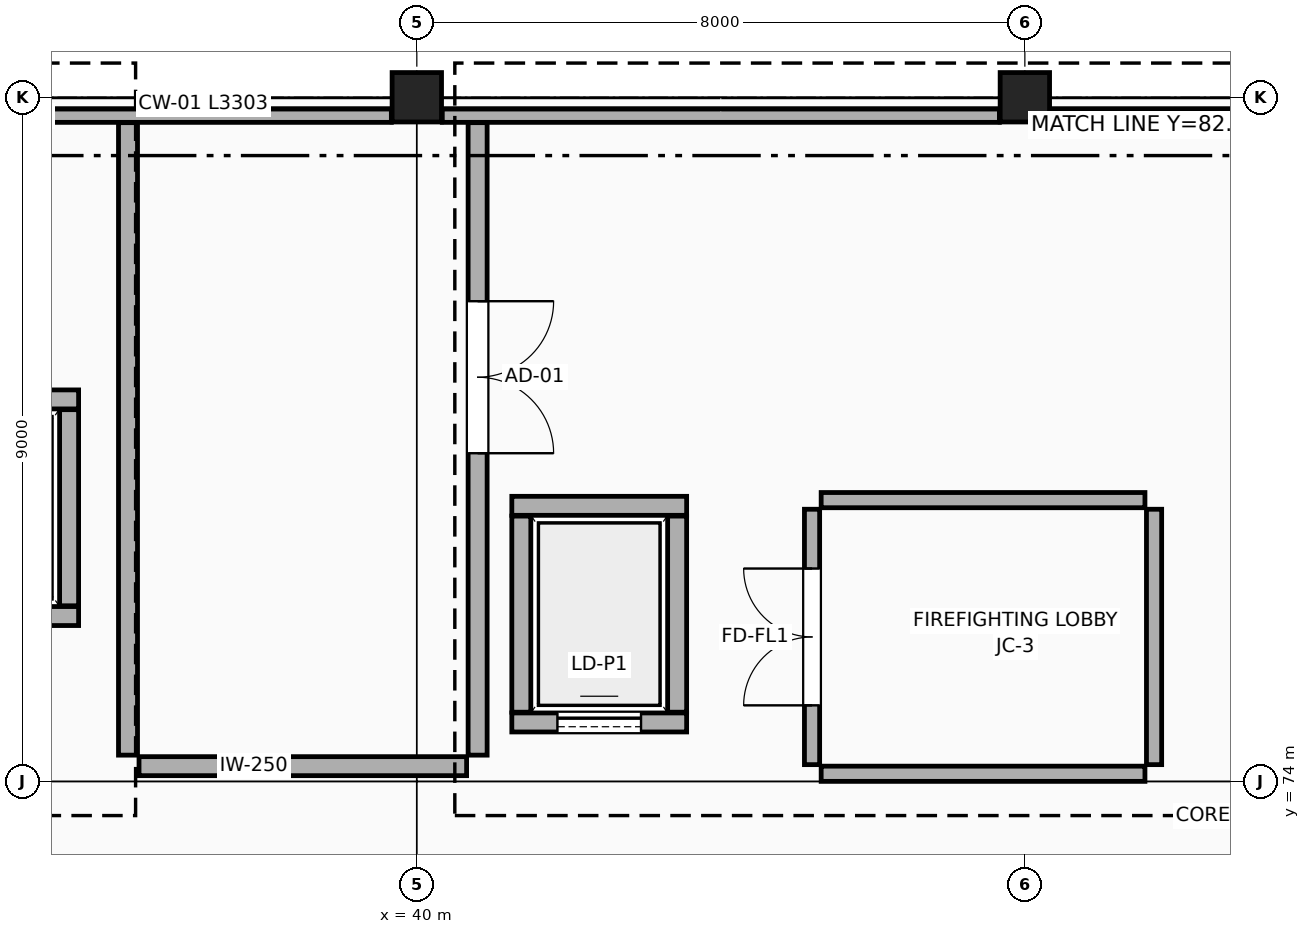
"""IFC4 building model, lengths in metres.
Left out: names, types, materials, properties, quantities, classifications, styles, units other than length and angle.
Written with IfcOpenShell. Run it as: python <this file> out.ifc"""

import sys

from ifc_helpers import new_model, si_unit, direction, frame, frame_2d, origin, origin_2d, place, context, subcontext, project, spatial, rectangle, extrude, element, fill, save


model = new_model("IFC4")
c1 = context("Model", 3, precision=1e-05, world=origin(), true_north=direction((0.0, 1.0)))
c2 = subcontext(c1, "Body", "Model", "MODEL_VIEW")
j1 = project(units=[si_unit("LENGTHUNIT", "METRE"), si_unit("PLANEANGLEUNIT", "RADIAN")], contexts=[c1])
p1 = place(None, origin())
s1 = spatial("IfcSite", under=j1, at=p1, CompositionType="ELEMENT")
p2 = place(p1, origin())
s2 = spatial("IfcBuilding", under=s1, at=p2, CompositionType="ELEMENT")
p3 = place(p2, frame((0.0, 0.0, 24.3)))
s3 = spatial("IfcBuildingStorey", under=s2, at=p3, CompositionType="ELEMENT", Elevation=24.3)
for number, where, z_axis, x_axis in (
    (1, (40.0, 83.0, 0.0), (0.0, 0.0, 1.0), (1.0, 0.0, 0.0)),
    (2, (48.0, 83.0, 0.0), (0.0, 0.0, 1.0), (1.0, 0.0, 0.0)),
):
    element("IfcColumn", number, at=place(p3, frame(where, z_axis=z_axis, x_axis=x_axis)), inside=s3, PredefinedType="COLUMN", context=c2, shape_type="SweptSolid", body=[
        extrude(rectangle(XDim=0.65, YDim=0.65, at=origin_2d()), origin(), (0.0, 0.0, 1.0), 4.46),
    ])
p4 = place(p3, frame((33.17, 82.76, 0.0), z_axis=(0.0, 0.0, 1.0), x_axis=(1.0, 0.0, 0.0)))
e3 = element("IfcWall", 3, at=p4, inside=s3, PredefinedType="PARAPET", context=c2, shape_type="SweptSolid", body=[
    extrude(rectangle(XDim=6.495, YDim=0.18, at=frame_2d((3.248, 0.0))), origin(), (0.0, 0.0, 1.0), 0.88),
])
p5 = place(p3, frame((40.335, 82.76, 0.0), z_axis=(0.0, 0.0, 1.0), x_axis=(1.0, 0.0, 0.0)))
e4 = element("IfcWall", 4, at=p5, inside=s3, PredefinedType="PARAPET", context=c2, shape_type="SweptSolid", body=[
    extrude(rectangle(XDim=7.33, YDim=0.18, at=frame_2d((3.665, 0.0))), origin(), (0.0, 0.0, 1.0), 0.88),
])
p6 = place(p3, frame((48.335, 82.76, 0.0), z_axis=(0.0, 0.0, 1.0), x_axis=(1.0, 0.0, 0.0)))
e5 = element("IfcWall", 5, at=p6, inside=s3, PredefinedType="PARAPET", context=c2, shape_type="SweptSolid", body=[
    extrude(rectangle(XDim=5.895, YDim=0.18, at=frame_2d((2.948, 0.0))), origin(), (0.0, 0.0, 1.0), 0.88),
])
p7 = place(p3, frame((41.25, 74.775, 0.0), z_axis=(0.0, 0.0, 1.0), x_axis=(1.0, 0.0, 0.0)))
e6 = element("IfcWall", 6, at=p7, inside=s3, PredefinedType="STANDARD", context=c2, shape_type="SweptSolid", body=[
    extrude(rectangle(XDim=2.3, YDim=0.25, at=frame_2d((1.15, 0.0))), origin(), (0.0, 0.0, 1.0), 4.27),
])
p8 = place(p7, frame((0.6, 0.0, 0.0)))
e7 = element("IfcOpeningElement", 7, at=p8, cuts=e6, PredefinedType="OPENING", context=c2, shape_type="SweptSolid", body=[
    extrude(rectangle(XDim=1.1, YDim=2.15, at=frame_2d((0.55, 1.075))), frame((0.0, 0.135, 0.0), z_axis=(0.0, -1.0, 0.0), x_axis=(1.0, 0.0, 0.0)), (0.0, 0.0, 1.0), 0.27),
])
p9 = place(p3, frame((43.55, 77.625, 0.0), z_axis=(0.0, 0.0, 1.0), x_axis=(-1.0, 0.0, 0.0)))
e8 = element("IfcWall", 8, at=p9, inside=s3, PredefinedType="STANDARD", context=c2, shape_type="SweptSolid", body=[
    extrude(rectangle(XDim=2.3, YDim=0.25, at=frame_2d((1.15, 0.0))), origin(), (0.0, 0.0, 1.0), 4.27),
])
for number, where, z_axis, x_axis in (
    (9, (43.425, 74.91, 0.0), (0.0, 0.0, 1.0), (0.0, 1.0, 0.0)),
    (10, (41.375, 77.49, 0.0), (0.0, 0.0, 1.0), (0.0, -1.0, 0.0)),
):
    element("IfcWall", number, at=place(p3, frame(where, z_axis=z_axis, x_axis=x_axis)), inside=s3, PredefinedType="STANDARD", context=c2, shape_type="SweptSolid", body=[
        extrude(rectangle(XDim=2.58, YDim=0.25, at=frame_2d((1.29, 0.0))), origin(), (0.0, 0.0, 1.0), 4.27),
    ])
p10 = place(p3, frame((33.25, 76.175, 0.0), z_axis=(0.0, 0.0, 1.0), x_axis=(1.0, 0.0, 0.0)))
e11 = element("IfcWall", 11, at=p10, inside=s3, PredefinedType="STANDARD", context=c2, shape_type="SweptSolid", body=[
    extrude(rectangle(XDim=2.3, YDim=0.25, at=frame_2d((1.15, 0.0))), origin(), (0.0, 0.0, 1.0), 4.27),
])
p11 = place(p10, frame((0.6, 0.0, 0.0)))
e12 = element("IfcOpeningElement", 12, at=p11, cuts=e11, PredefinedType="OPENING", context=c2, shape_type="SweptSolid", body=[
    extrude(rectangle(XDim=1.1, YDim=2.15, at=frame_2d((0.55, 1.075))), frame((0.0, 0.135, 0.0), z_axis=(0.0, -1.0, 0.0), x_axis=(1.0, 0.0, 0.0)), (0.0, 0.0, 1.0), 0.27),
])
p12 = place(p3, frame((35.55, 79.025, 0.0), z_axis=(0.0, 0.0, 1.0), x_axis=(-1.0, 0.0, 0.0)))
e13 = element("IfcWall", 13, at=p12, inside=s3, PredefinedType="STANDARD", context=c2, shape_type="SweptSolid", body=[
    extrude(rectangle(XDim=2.3, YDim=0.25, at=frame_2d((1.15, 0.0))), origin(), (0.0, 0.0, 1.0), 4.27),
])
p13 = place(p3, frame((35.425, 76.31, 0.0), z_axis=(0.0, 0.0, 1.0), x_axis=(0.0, 1.0, 0.0)))
e14 = element("IfcWall", 14, at=p13, inside=s3, PredefinedType="STANDARD", context=c2, shape_type="SweptSolid", body=[
    extrude(rectangle(XDim=2.58, YDim=0.25, at=frame_2d((1.29, 0.0))), origin(), (0.0, 0.0, 1.0), 4.27),
])
p14 = place(p3, frame((45.2, 74.22, 0.0), z_axis=(0.0, 0.0, 1.0), x_axis=(0.0, 1.0, 0.0)))
e15 = element("IfcWall", 15, at=p14, inside=s3, PredefinedType="PARTITIONING", context=c2, shape_type="SweptSolid", body=[
    extrude(rectangle(XDim=3.36, YDim=0.2, at=frame_2d((1.68, 0.0))), origin(), (0.0, 0.0, 1.0), 4.27),
])
p15 = place(p14, frame((0.78, 0.0, 0.0)))
e16 = element("IfcOpeningElement", 16, at=p15, cuts=e15, PredefinedType="OPENING", context=c2, shape_type="SweptSolid", body=[
    extrude(rectangle(XDim=1.8, YDim=2.15, at=frame_2d((0.9, 1.075))), frame((0.0, 0.11, 0.0), z_axis=(0.0, -1.0, 0.0), x_axis=(1.0, 0.0, 0.0)), (0.0, 0.0, 1.0), 0.22),
])
p16 = place(p3, frame((45.32, 77.7, 0.0), z_axis=(0.0, 0.0, 1.0), x_axis=(1.0, 0.0, 0.0)))
e17 = element("IfcWall", 17, at=p16, inside=s3, PredefinedType="PARTITIONING", context=c2, shape_type="SweptSolid", body=[
    extrude(rectangle(XDim=4.26, YDim=0.2, at=frame_2d((2.13, 0.0))), origin(), (0.0, 0.0, 1.0), 4.27),
])
p17 = place(p3, frame((49.7, 77.58, 0.0), z_axis=(0.0, 0.0, 1.0), x_axis=(0.0, -1.0, 0.0)))
e18 = element("IfcWall", 18, at=p17, inside=s3, PredefinedType="PARTITIONING", context=c2, shape_type="SweptSolid", body=[
    extrude(rectangle(XDim=3.36, YDim=0.2, at=frame_2d((1.68, 0.0))), origin(), (0.0, 0.0, 1.0), 4.27),
])
p18 = place(p3, frame((49.58, 74.1, 0.0), z_axis=(0.0, 0.0, 1.0), x_axis=(-1.0, 0.0, 0.0)))
e19 = element("IfcWall", 19, at=p18, inside=s3, PredefinedType="PARTITIONING", context=c2, shape_type="SweptSolid", body=[
    extrude(rectangle(XDim=4.26, YDim=0.2, at=frame_2d((2.13, 0.0))), origin(), (0.0, 0.0, 1.0), 4.27),
])
p19 = place(p3, frame((40.8, 82.666, 0.0), z_axis=(0.0, 0.0, 1.0), x_axis=(0.0, -1.0, 0.0)))
e20 = element("IfcWall", 20, at=p19, inside=s3, PredefinedType="PARTITIONING", context=c2, shape_type="SweptSolid", body=[
    extrude(rectangle(XDim=8.321, YDim=0.25, at=frame_2d((4.161, 0.0))), origin(), (0.0, 0.0, 1.0), 4.27),
])
p20 = place(p19, frame((2.349, 0.0, 0.0)))
e21 = element("IfcOpeningElement", 21, at=p20, cuts=e20, PredefinedType="OPENING", context=c2, shape_type="SweptSolid", body=[
    extrude(rectangle(XDim=2.0, YDim=2.35, at=frame_2d((1.0, 1.175))), frame((0.0, 0.135, 0.0), z_axis=(0.0, -1.0, 0.0), x_axis=(1.0, 0.0, 0.0)), (0.0, 0.0, 1.0), 0.27),
])
p21 = place(p3, frame((40.655, 74.2, 0.0), z_axis=(0.0, 0.0, 1.0), x_axis=(-1.0, 0.0, 0.0)))
e22 = element("IfcWall", 22, at=p21, inside=s3, PredefinedType="PARTITIONING", context=c2, shape_type="SweptSolid", body=[
    extrude(rectangle(XDim=4.31, YDim=0.25, at=frame_2d((2.155, 0.0))), origin(), (0.0, 0.0, 1.0), 4.27),
])
p22 = place(p3, frame((36.2, 74.345, 0.0), z_axis=(0.0, 0.0, 1.0), x_axis=(0.0, 1.0, 0.0)))
e23 = element("IfcWall", 23, at=p22, inside=s3, PredefinedType="PARTITIONING", context=c2, shape_type="SweptSolid", body=[
    extrude(rectangle(XDim=8.321, YDim=0.25, at=frame_2d((4.161, 0.0))), origin(), (0.0, 0.0, 1.0), 4.27),
])
p23 = place(p8, origin())
e24 = element("IfcDoor", 24, at=p23, inside=s3, OperationType="DOUBLE_DOOR_SLIDING", PredefinedType="DOOR", context=c2, shape_type="SweptSolid", body=[
    extrude(rectangle(XDim=1.1, YDim=2.15, at=frame_2d((0.55, 1.075))), frame((0.0, 0.025, 0.0), z_axis=(0.0, -1.0, 0.0), x_axis=(1.0, 0.0, 0.0)), (0.0, 0.0, 1.0), 0.05),
])
fill(e7, e24)
p24 = place(p15, origin())
e25 = element("IfcDoor", 25, at=p24, inside=s3, OperationType="DOUBLE_DOOR_SINGLE_SWING", PredefinedType="DOOR", context=c2, shape_type="SweptSolid", body=[
    extrude(rectangle(XDim=1.8, YDim=2.15, at=frame_2d((0.9, 1.075))), frame((0.0, 0.025, 0.0), z_axis=(0.0, -1.0, 0.0), x_axis=(1.0, 0.0, 0.0)), (0.0, 0.0, 1.0), 0.05),
])
fill(e16, e25)
p25 = place(p20, origin())
e26 = element("IfcDoor", 26, at=p25, inside=s3, OperationType="DOUBLE_SWING_LEFT", PredefinedType="DOOR", context=c2, shape_type="SweptSolid", body=[
    extrude(rectangle(XDim=2.0, YDim=2.35, at=frame_2d((1.0, 1.175))), frame((0.0, 0.025, 0.0), z_axis=(0.0, -1.0, 0.0), x_axis=(1.0, 0.0, 0.0)), (0.0, 0.0, 1.0), 0.05),
])
fill(e21, e26)
save(model, sys.argv[1])
